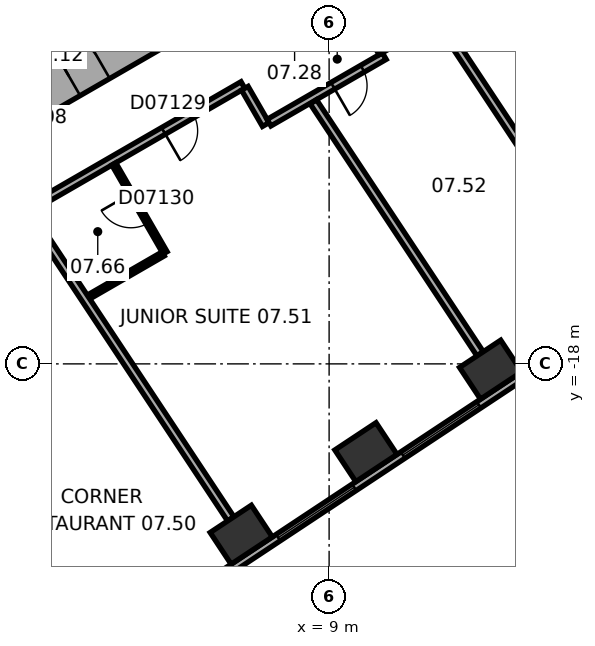
"""IFC4 building model, lengths in metres.
Left out: names, types, materials, properties, quantities, classifications, styles, units other than length and angle.
Written with IfcOpenShell. Run it as: python <this file> out.ifc"""

import sys

from ifc_helpers import new_model, si_unit, direction, frame, frame_2d, origin, origin_2d, place, context, subcontext, project, spatial, rectangle, extrude, element, fill, save


model = new_model("IFC4")
c1 = context("Model", 3, precision=1e-05, world=origin(), true_north=direction((0.0, 1.0)))
c2 = subcontext(c1, "Body", "Model", "MODEL_VIEW")
j1 = project(units=[si_unit("LENGTHUNIT", "METRE"), si_unit("PLANEANGLEUNIT", "RADIAN")], contexts=[c1])
p1 = place(None, origin())
s1 = spatial("IfcSite", under=j1, at=p1, CompositionType="ELEMENT")
p2 = place(p1, origin())
s2 = spatial("IfcBuilding", under=s1, at=p2, CompositionType="ELEMENT")
p3 = place(p2, frame((0.0, 0.0, 44.0)))
s3 = spatial("IfcBuildingStorey", under=s2, at=p3, CompositionType="ELEMENT", Elevation=44.0)
for number, where, z_axis, x_axis in (
    (1, (6.688, -22.496, 0.0), (0.0, 0.0, 1.0), (0.834, 0.552, 0.0)),
    (2, (9.969, -20.324, 0.0), (0.0, 0.0, 1.0), (0.834, 0.552, 0.0)),
    (3, (13.25, -18.152, 0.0), (0.0, 0.0, 1.0), (0.834, 0.552, 0.0)),
):
    element("IfcColumn", number, at=place(p3, frame(where, z_axis=z_axis, x_axis=x_axis)), inside=s3, PredefinedType="COLUMN", context=c2, shape_type="SweptSolid", body=[
        extrude(rectangle(XDim=1.3, YDim=1.0, at=origin_2d()), origin(), (0.0, 0.0, 1.0), 3.3),
    ])
p4 = place(p3, frame((-0.3, -11.836, 0.0), z_axis=(0.0, 0.0, 1.0), x_axis=(0.866021384402, 0.500006961711, 0.0)))
e4 = element("IfcWall", 4, at=p4, inside=s3, PredefinedType="SHEAR", context=c2, shape_type="SweptSolid", body=[
    extrude(rectangle(XDim=12.355, YDim=1.2, at=frame_2d((6.178, 0.0))), origin(), (0.0, 0.0, 1.0), 3.3),
])
p5 = place(p4, frame((2.828, 0.0, 0.0)))
e5 = element("IfcOpeningElement", 5, at=p5, cuts=e4, PredefinedType="OPENING", context=c2, shape_type="SweptSolid", body=[
    extrude(rectangle(XDim=0.9, YDim=2.1, at=frame_2d((0.45, 1.05))), frame((0.0, 0.61, 0.0), z_axis=(0.0, -1.0, 0.0), x_axis=(1.0, 0.0, 0.0)), (0.0, 0.0, 1.0), 1.22),
])
p6 = place(p4, frame((5.428, 0.0, 0.0)))
e6 = element("IfcOpeningElement", 6, at=p6, cuts=e4, PredefinedType="OPENING", context=c2, shape_type="SweptSolid", body=[
    extrude(rectangle(XDim=0.9, YDim=2.1, at=frame_2d((0.45, 1.05))), frame((0.0, 0.61, 0.0), z_axis=(0.0, -1.0, 0.0), x_axis=(1.0, 0.0, 0.0)), (0.0, 0.0, 1.0), 1.22),
])
p7 = place(p4, frame((7.928, 0.0, 0.0)))
e7 = element("IfcOpeningElement", 7, at=p7, cuts=e4, PredefinedType="OPENING", context=c2, shape_type="SweptSolid", body=[
    extrude(rectangle(XDim=1.1, YDim=2.1, at=frame_2d((0.55, 1.05))), frame((0.0, 0.61, 0.0), z_axis=(0.0, -1.0, 0.0), x_axis=(1.0, 0.0, 0.0)), (0.0, 0.0, 1.0), 1.22),
])
p8 = place(p3, frame((3.083, -25.601, 0.0), z_axis=(0.0, 0.0, 1.0), x_axis=(0.833884295743, 0.551939291329, 0.0)))
e8 = element("IfcWall", 8, at=p8, inside=s3, PredefinedType="STANDARD", context=c2, shape_type="SweptSolid", body=[
    extrude(rectangle(XDim=21.246, YDim=0.2, at=frame_2d((10.623, 0.0))), origin(), (0.0, 0.0, 1.0), 3.3),
])
p9 = place(p8, frame((1.553, 0.0, 0.8)))
e9 = element("IfcOpeningElement", 9, at=p9, cuts=e8, PredefinedType="OPENING", context=c2, shape_type="SweptSolid", body=[
    extrude(rectangle(XDim=2.4, YDim=1.7, at=frame_2d((1.2, 0.85))), frame((0.0, 0.11, 0.0), z_axis=(0.0, -1.0, 0.0), x_axis=(1.0, 0.0, 0.0)), (0.0, 0.0, 1.0), 0.22),
])
p10 = place(p8, frame((5.488, 0.0, 0.8)))
e10 = element("IfcOpeningElement", 10, at=p10, cuts=e8, PredefinedType="OPENING", context=c2, shape_type="SweptSolid", body=[
    extrude(rectangle(XDim=2.4, YDim=1.7, at=frame_2d((1.2, 0.85))), frame((0.0, 0.11, 0.0), z_axis=(0.0, -1.0, 0.0), x_axis=(1.0, 0.0, 0.0)), (0.0, 0.0, 1.0), 0.22),
])
p11 = place(p8, frame((9.422, 0.0, 0.8)))
e11 = element("IfcOpeningElement", 11, at=p11, cuts=e8, PredefinedType="OPENING", context=c2, shape_type="SweptSolid", body=[
    extrude(rectangle(XDim=2.4, YDim=1.7, at=frame_2d((1.2, 0.85))), frame((0.0, 0.11, 0.0), z_axis=(0.0, -1.0, 0.0), x_axis=(1.0, 0.0, 0.0)), (0.0, 0.0, 1.0), 0.22),
])
p12 = place(p8, frame((13.357, 0.0, 0.8)))
e12 = element("IfcOpeningElement", 12, at=p12, cuts=e8, PredefinedType="OPENING", context=c2, shape_type="SweptSolid", body=[
    extrude(rectangle(XDim=2.4, YDim=1.7, at=frame_2d((1.2, 0.85))), frame((0.0, 0.11, 0.0), z_axis=(0.0, -1.0, 0.0), x_axis=(1.0, 0.0, 0.0)), (0.0, 0.0, 1.0), 0.22),
])
p13 = place(p8, frame((17.291, 0.0, 0.8)))
e13 = element("IfcOpeningElement", 13, at=p13, cuts=e8, PredefinedType="OPENING", context=c2, shape_type="SweptSolid", body=[
    extrude(rectangle(XDim=2.4, YDim=1.7, at=frame_2d((1.2, 0.85))), frame((0.0, 0.11, 0.0), z_axis=(0.0, -1.0, 0.0), x_axis=(1.0, 0.0, 0.0)), (0.0, 0.0, 1.0), 0.22),
])
p14 = place(p3, frame((1.033, -13.953, 0.0), z_axis=(0.0, 0.0, 1.0), x_axis=(0.866017531406, 0.500013635111, 0.0)))
e14 = element("IfcWall", 14, at=p14, inside=s3, PredefinedType="PARTITIONING", context=c2, shape_type="SweptSolid", body=[
    extrude(rectangle(XDim=6.58, YDim=0.2, at=frame_2d((3.29, 0.0))), origin(), (0.0, 0.0, 1.0), 3.05),
])
p15 = place(p14, frame((4.165, 0.0, 0.0)))
e15 = element("IfcOpeningElement", 15, at=p15, cuts=e14, PredefinedType="OPENING", context=c2, shape_type="SweptSolid", body=[
    extrude(rectangle(XDim=0.9, YDim=2.1, at=frame_2d((0.45, 1.05))), frame((0.0, 0.11, 0.0), z_axis=(0.0, -1.0, 0.0), x_axis=(1.0, 0.0, 0.0)), (0.0, 0.0, 1.0), 0.22),
])
p16 = place(p3, frame((3.335, -12.739, 0.0), z_axis=(0.0, 0.0, 1.0), x_axis=(0.499980770555, -0.866036505625, 0.0)))
e16 = element("IfcWall", 16, at=p16, inside=s3, PredefinedType="PARTITIONING", context=c2, shape_type="SweptSolid", body=[
    extrude(rectangle(XDim=2.7, YDim=0.12, at=frame_2d((1.35, 0.0))), origin(), (0.0, 0.0, 1.0), 3.05),
])
p17 = place(p16, frame((0.9, 0.0, 0.0)))
e17 = element("IfcOpeningElement", 17, at=p17, cuts=e16, PredefinedType="OPENING", context=c2, shape_type="SweptSolid", body=[
    extrude(rectangle(XDim=0.9, YDim=2.1, at=frame_2d((0.45, 1.05))), frame((0.0, 0.07, 0.0), z_axis=(0.0, -1.0, 0.0), x_axis=(1.0, 0.0, 0.0)), (0.0, 0.0, 1.0), 0.14),
])
p18 = place(p3, frame((4.633, -15.107, 0.0), z_axis=(0.0, 0.0, 1.0), x_axis=(-0.866022496617, -0.500005035328, 0.0)))
e18 = element("IfcWall", 18, at=p18, inside=s3, PredefinedType="PARTITIONING", context=c2, shape_type="SweptSolid", body=[
    extrude(rectangle(XDim=2.269, YDim=0.12, at=frame_2d((1.134, 0.0))), origin(), (0.0, 0.0, 1.0), 3.05),
])
p19 = place(p3, frame((6.412, -22.079, 0.0), z_axis=(0.0, 0.0, 1.0), x_axis=(-0.551919507115, 0.83389739037, 0.0)))
e19 = element("IfcWall", 19, at=p19, inside=s3, PredefinedType="PARTITIONING", context=c2, shape_type="SweptSolid", body=[
    extrude(rectangle(XDim=9.635, YDim=0.2, at=frame_2d((4.817, 0.0))), origin(), (0.0, 0.0, 1.0), 3.05),
])
p20 = place(p3, frame((6.782, -10.749, 0.0), z_axis=(0.0, 0.0, 1.0), x_axis=(0.500074377092, -0.865982457891, 0.0)))
e20 = element("IfcWall", 20, at=p20, inside=s3, PredefinedType="PARTITIONING", context=c2, shape_type="SweptSolid", body=[
    extrude(rectangle(XDim=1.101, YDim=0.2, at=frame_2d((0.55, 0.0))), origin(), (0.0, 0.0, 1.0), 3.05),
])
p21 = place(p3, frame((7.419, -11.653, 0.0), z_axis=(0.0, 0.0, 1.0), x_axis=(0.866038154057, 0.49997791523, 0.0)))
e21 = element("IfcWall", 21, at=p21, inside=s3, PredefinedType="PARTITIONING", context=c2, shape_type="SweptSolid", body=[
    extrude(rectangle(XDim=3.502, YDim=0.2, at=frame_2d((1.751, 0.0))), origin(), (0.0, 0.0, 1.0), 3.05),
])
p22 = place(p21, frame((1.94, 0.0, 0.0)))
e22 = element("IfcOpeningElement", 22, at=p22, cuts=e21, PredefinedType="OPENING", context=c2, shape_type="SweptSolid", body=[
    extrude(rectangle(XDim=0.9, YDim=2.1, at=frame_2d((0.45, 1.05))), frame((0.0, 0.11, 0.0), z_axis=(0.0, -1.0, 0.0), x_axis=(1.0, 0.0, 0.0)), (0.0, 0.0, 1.0), 0.22),
])
p23 = place(p3, frame((10.402, -9.815, 0.0), z_axis=(0.0, 0.0, 1.0), x_axis=(-0.499968756647, 0.866043441391, 0.0)))
e23 = element("IfcWall", 23, at=p23, inside=s3, PredefinedType="PARTITIONING", context=c2, shape_type="SweptSolid", body=[
    extrude(rectangle(XDim=1.001, YDim=0.2, at=frame_2d((0.5, 0.0))), origin(), (0.0, 0.0, 1.0), 3.05),
])
p24 = place(p3, frame((12.974, -17.735, 0.0), z_axis=(0.0, 0.0, 1.0), x_axis=(-0.55192625685, 0.833892922982, 0.0)))
e24 = element("IfcWall", 24, at=p24, inside=s3, PredefinedType="PARTITIONING", context=c2, shape_type="SweptSolid", body=[
    extrude(rectangle(XDim=7.95, YDim=0.2, at=frame_2d((3.975, 0.0))), origin(), (0.0, 0.0, 1.0), 3.05),
])
p25 = place(p3, frame((16.255, -15.564, 0.0), z_axis=(0.0, 0.0, 1.0), x_axis=(-0.55192208744, 0.833895682562, 0.0)))
e25 = element("IfcWall", 25, at=p25, inside=s3, PredefinedType="PARTITIONING", context=c2, shape_type="SweptSolid", body=[
    extrude(rectangle(XDim=8.913, YDim=0.2, at=frame_2d((4.457, 0.0))), origin(), (0.0, 0.0, 1.0), 2.6),
])
p26 = place(p10, origin())
e26 = element("IfcWindow", 26, at=p26, inside=s3, PartitioningType="SINGLE_PANEL", PredefinedType="WINDOW", context=c2, shape_type="SweptSolid", body=[
    extrude(rectangle(XDim=2.4, YDim=1.7, at=frame_2d((1.2, 0.85))), frame((0.0, 0.03, 0.0), z_axis=(0.0, -1.0, 0.0), x_axis=(1.0, 0.0, 0.0)), (0.0, 0.0, 1.0), 0.06),
])
fill(e10, e26)
p27 = place(p11, origin())
e27 = element("IfcWindow", 27, at=p27, inside=s3, PartitioningType="SINGLE_PANEL", PredefinedType="WINDOW", context=c2, shape_type="SweptSolid", body=[
    extrude(rectangle(XDim=2.4, YDim=1.7, at=frame_2d((1.2, 0.85))), frame((0.0, 0.03, 0.0), z_axis=(0.0, -1.0, 0.0), x_axis=(1.0, 0.0, 0.0)), (0.0, 0.0, 1.0), 0.06),
])
fill(e11, e27)
p28 = place(p5, origin())
e28 = element("IfcDoor", 28, at=p28, inside=s3, OperationType="SINGLE_SWING_LEFT", PredefinedType="DOOR", context=c2, shape_type="SweptSolid", body=[
    extrude(rectangle(XDim=0.9, YDim=2.1, at=frame_2d((0.45, 1.05))), frame((0.0, 0.025, 0.0), z_axis=(0.0, -1.0, 0.0), x_axis=(1.0, 0.0, 0.0)), (0.0, 0.0, 1.0), 0.05),
])
fill(e5, e28)
p29 = place(p15, origin())
e29 = element("IfcDoor", 29, at=p29, inside=s3, OperationType="SINGLE_SWING_LEFT", PredefinedType="DOOR", context=c2, shape_type="SweptSolid", body=[
    extrude(rectangle(XDim=0.9, YDim=2.1, at=frame_2d((0.45, 1.05))), frame((0.0, 0.025, 0.0), z_axis=(0.0, -1.0, 0.0), x_axis=(1.0, 0.0, 0.0)), (0.0, 0.0, 1.0), 0.05),
])
fill(e15, e29)
p30 = place(p17, origin())
e30 = element("IfcDoor", 30, at=p30, inside=s3, OperationType="SINGLE_SWING_LEFT", PredefinedType="DOOR", context=c2, shape_type="SweptSolid", body=[
    extrude(rectangle(XDim=0.9, YDim=2.1, at=frame_2d((0.45, 1.05))), frame((0.0, 0.025, 0.0), z_axis=(0.0, -1.0, 0.0), x_axis=(1.0, 0.0, 0.0)), (0.0, 0.0, 1.0), 0.05),
])
fill(e17, e30)
p31 = place(p22, origin())
e31 = element("IfcDoor", 31, at=p31, inside=s3, OperationType="SINGLE_SWING_LEFT", PredefinedType="DOOR", context=c2, shape_type="SweptSolid", body=[
    extrude(rectangle(XDim=0.9, YDim=2.1, at=frame_2d((0.45, 1.05))), frame((0.0, 0.025, 0.0), z_axis=(0.0, -1.0, 0.0), x_axis=(1.0, 0.0, 0.0)), (0.0, 0.0, 1.0), 0.05),
])
fill(e22, e31)
save(model, sys.argv[1])
